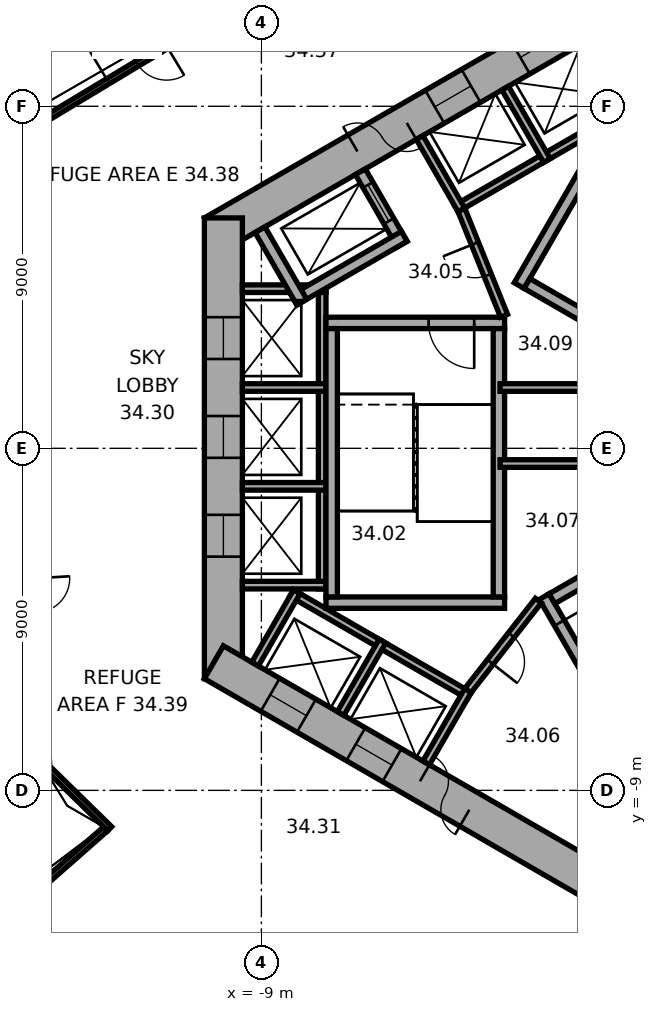
"""IFC4 building model, lengths in metres.
Left out: names, types, materials, properties, quantities, classifications, styles, units other than length and angle.
Written with IfcOpenShell. Run it as: python <this file> out.ifc"""

import sys

from ifc_helpers import new_model, si_unit, direction, frame, frame_2d, origin, place, context, subcontext, project, spatial, rectangle, extrude, element, fill, save


model = new_model("IFC4")
c1 = context("Model", 3, precision=1e-05, world=origin(), true_north=direction((0.0, 1.0)))
c2 = subcontext(c1, "Body", "Model", "MODEL_VIEW")
j1 = project(units=[si_unit("LENGTHUNIT", "METRE"), si_unit("PLANEANGLEUNIT", "RADIAN")], contexts=[c1])
p1 = place(None, origin())
s1 = spatial("IfcSite", under=j1, at=p1, CompositionType="ELEMENT")
p2 = place(p1, origin())
s2 = spatial("IfcBuilding", under=s1, at=p2, CompositionType="ELEMENT")
p3 = place(p2, frame((0.0, 0.0, 139.2)))
s3 = spatial("IfcBuildingStorey", under=s2, at=p3, CompositionType="ELEMENT", Elevation=139.2)
p4 = place(p3, frame((0.25, 11.691, 0.0), z_axis=(0.0, 0.0, 1.0), x_axis=(-0.866022616891, -0.50000482701, 0.0)))
e1 = element("IfcWall", 1, at=p4, inside=s3, PredefinedType="SHEAR", context=c2, shape_type="SweptSolid", body=[
    extrude(rectangle(XDim=12.125, YDim=1.0, at=frame_2d((6.062, 0.0))), origin(), (0.0, 0.0, 1.0), 7.4),
])
p5 = place(p4, frame((6.262, 0.0, 0.0)))
e2 = element("IfcOpeningElement", 2, at=p5, cuts=e1, PredefinedType="OPENING", context=c2, shape_type="SweptSolid", body=[
    extrude(rectangle(XDim=1.5, YDim=2.1, at=frame_2d((0.75, 1.05))), frame((0.0, 0.51, 0.0), z_axis=(0.0, -1.0, 0.0), x_axis=(1.0, 0.0, 0.0)), (0.0, 0.0, 1.0), 1.02),
])
p6 = place(p4, frame((1.712, 0.0, 0.0)))
e3 = element("IfcOpeningElement", 3, at=p6, cuts=e1, PredefinedType="OPENING", context=c2, shape_type="SweptSolid", body=[
    extrude(rectangle(XDim=1.1, YDim=2.1, at=frame_2d((0.55, 1.05))), frame((0.0, 0.51, 0.0), z_axis=(0.0, -1.0, 0.0), x_axis=(1.0, 0.0, 0.0)), (0.0, 0.0, 1.0), 1.02),
])
p7 = place(p4, frame((4.312, 0.0, 0.0)))
e4 = element("IfcOpeningElement", 4, at=p7, cuts=e1, PredefinedType="OPENING", context=c2, shape_type="SweptSolid", body=[
    extrude(rectangle(XDim=1.1, YDim=2.1, at=frame_2d((0.55, 1.05))), frame((0.0, 0.51, 0.0), z_axis=(0.0, -1.0, 0.0), x_axis=(1.0, 0.0, 0.0)), (0.0, 0.0, 1.0), 1.02),
])
p8 = place(p3, frame((-10.0, 6.062, 0.0), z_axis=(0.0, 0.0, 1.0), x_axis=(0.0, -1.0, 0.0)))
e5 = element("IfcWall", 5, at=p8, inside=s3, PredefinedType="SHEAR", context=c2, shape_type="SweptSolid", body=[
    extrude(rectangle(XDim=12.125, YDim=1.0, at=frame_2d((6.062, 0.0))), origin(), (0.0, 0.0, 1.0), 7.4),
])
p9 = place(p8, frame((5.212, 0.0, 0.0)))
e6 = element("IfcOpeningElement", 6, at=p9, cuts=e5, PredefinedType="OPENING", context=c2, shape_type="SweptSolid", body=[
    extrude(rectangle(XDim=1.1, YDim=2.1, at=frame_2d((0.55, 1.05))), frame((0.0, 0.51, 0.0), z_axis=(0.0, -1.0, 0.0), x_axis=(1.0, 0.0, 0.0)), (0.0, 0.0, 1.0), 1.02),
])
p10 = place(p8, frame((7.812, 0.0, 0.0)))
e7 = element("IfcOpeningElement", 7, at=p10, cuts=e5, PredefinedType="OPENING", context=c2, shape_type="SweptSolid", body=[
    extrude(rectangle(XDim=1.1, YDim=2.1, at=frame_2d((0.55, 1.05))), frame((0.0, 0.51, 0.0), z_axis=(0.0, -1.0, 0.0), x_axis=(1.0, 0.0, 0.0)), (0.0, 0.0, 1.0), 1.02),
])
p11 = place(p8, frame((2.612, 0.0, 0.0)))
e8 = element("IfcOpeningElement", 8, at=p11, cuts=e5, PredefinedType="OPENING", context=c2, shape_type="SweptSolid", body=[
    extrude(rectangle(XDim=1.1, YDim=2.1, at=frame_2d((0.55, 1.05))), frame((0.0, 0.51, 0.0), z_axis=(0.0, -1.0, 0.0), x_axis=(1.0, 0.0, 0.0)), (0.0, 0.0, 1.0), 1.02),
])
p12 = place(p3, frame((-10.25, -5.629, 0.0), z_axis=(0.0, 0.0, 1.0), x_axis=(0.866022616891, -0.50000482701, 0.0)))
e9 = element("IfcWall", 9, at=p12, inside=s3, PredefinedType="SHEAR", context=c2, shape_type="SweptSolid", body=[
    extrude(rectangle(XDim=12.125, YDim=1.0, at=frame_2d((6.062, 0.0))), origin(), (0.0, 0.0, 1.0), 7.4),
])
p13 = place(p12, frame((6.262, 0.0, 0.0)))
e10 = element("IfcOpeningElement", 10, at=p13, cuts=e9, PredefinedType="OPENING", context=c2, shape_type="SweptSolid", body=[
    extrude(rectangle(XDim=1.5, YDim=2.1, at=frame_2d((0.75, 1.05))), frame((0.0, 0.51, 0.0), z_axis=(0.0, -1.0, 0.0), x_axis=(1.0, 0.0, 0.0)), (0.0, 0.0, 1.0), 1.02),
])
p14 = place(p12, frame((1.712, 0.0, 0.0)))
e11 = element("IfcOpeningElement", 11, at=p14, cuts=e9, PredefinedType="OPENING", context=c2, shape_type="SweptSolid", body=[
    extrude(rectangle(XDim=1.1, YDim=2.1, at=frame_2d((0.55, 1.05))), frame((0.0, 0.51, 0.0), z_axis=(0.0, -1.0, 0.0), x_axis=(1.0, 0.0, 0.0)), (0.0, 0.0, 1.0), 1.02),
])
p15 = place(p12, frame((4.312, 0.0, 0.0)))
e12 = element("IfcOpeningElement", 12, at=p15, cuts=e9, PredefinedType="OPENING", context=c2, shape_type="SweptSolid", body=[
    extrude(rectangle(XDim=1.1, YDim=2.1, at=frame_2d((0.55, 1.05))), frame((0.0, 0.51, 0.0), z_axis=(0.0, -1.0, 0.0), x_axis=(1.0, 0.0, 0.0)), (0.0, 0.0, 1.0), 1.02),
])
p16 = place(p3, frame((-17.239, -13.656, 0.0), z_axis=(0.0, 0.0, 1.0), x_axis=(0.750678331628, 0.660667876034, 0.0)))
e13 = element("IfcWall", 13, at=p16, inside=s3, PredefinedType="STANDARD", context=c2, shape_type="SweptSolid", body=[
    extrude(rectangle(XDim=5.506, YDim=0.15, at=frame_2d((2.753, 0.0))), origin(), (0.0, 0.0, 1.0), 2.6),
])
p17 = place(p3, frame((-12.991, -10.01, 0.0), z_axis=(0.0, 0.0, 1.0), x_axis=(-0.714492233151, 0.69964337256, 0.0)))
e14 = element("IfcWall", 14, at=p17, inside=s3, PredefinedType="STANDARD", context=c2, shape_type="SweptSolid", body=[
    extrude(rectangle(XDim=2.236, YDim=0.15, at=frame_2d((1.118, 0.0))), origin(), (0.0, 0.0, 1.0), 2.6),
])
p18 = place(p3, frame((-15.687, 8.062, 0.0), z_axis=(0.0, 0.0, 1.0), x_axis=(0.856487923842, 0.516167062406, 0.0)))
e15 = element("IfcWall", 15, at=p18, inside=s3, PredefinedType="STANDARD", context=c2, shape_type="SweptSolid", body=[
    extrude(rectangle(XDim=15.973, YDim=0.15, at=frame_2d((7.987, 0.0))), origin(), (0.0, 0.0, 1.0), 2.6),
])
p19 = place(p18, frame((3.093, 0.0, 0.0)))
e16 = element("IfcOpeningElement", 16, at=p19, cuts=e15, PredefinedType="OPENING", context=c2, shape_type="SweptSolid", body=[
    extrude(rectangle(XDim=1.8, YDim=2.4, at=frame_2d((0.9, 1.2))), frame((0.0, 0.085, 0.0), z_axis=(0.0, -1.0, 0.0), x_axis=(1.0, 0.0, 0.0)), (0.0, 0.0, 1.0), 0.17),
])
p20 = place(p18, frame((11.08, 0.0, 0.0)))
e17 = element("IfcOpeningElement", 17, at=p20, cuts=e15, PredefinedType="OPENING", context=c2, shape_type="SweptSolid", body=[
    extrude(rectangle(XDim=1.8, YDim=2.4, at=frame_2d((0.9, 1.2))), frame((0.0, 0.085, 0.0), z_axis=(0.0, -1.0, 0.0), x_axis=(1.0, 0.0, 0.0)), (0.0, 0.0, 1.0), 0.17),
])
p21 = place(p3, frame((0.803, 9.009, 0.0), z_axis=(0.0, 0.0, 1.0), x_axis=(-0.866028230842, -0.499995103361, 0.0)))
e18 = element("IfcWall", 18, at=p21, inside=s3, PredefinedType="PARTITIONING", context=c2, shape_type="SweptSolid", body=[
    extrude(rectangle(XDim=5.4, YDim=0.2, at=frame_2d((2.7, 0.0))), origin(), (0.0, 0.0, 1.0), 7.12),
])
for number, where, z_axis, x_axis in (
    (19, (-1.485, 7.572, 0.0), (0.0, 0.0, 1.0), (-0.5, 0.866, 0.0)),
    (20, (-3.737, 6.272, 0.0), (0.0, 0.0, 1.0), (-0.5, 0.866, 0.0)),
):
    element("IfcWall", number, at=place(p3, frame(where, z_axis=z_axis, x_axis=x_axis)), inside=s3, PredefinedType="PARTITIONING", context=c2, shape_type="SweptSolid", body=[
        extrude(rectangle(XDim=2.2, YDim=0.2, at=frame_2d((1.1, 0.0))), origin(), (0.0, 0.0, 1.0), 7.12),
    ])
p22 = place(p3, frame((-7.4, 4.3, 0.0), z_axis=(0.0, 0.0, 1.0), x_axis=(0.0, -1.0, 0.0)))
e21 = element("IfcWall", 21, at=p22, inside=s3, PredefinedType="PARTITIONING", context=c2, shape_type="SweptSolid", body=[
    extrude(rectangle(XDim=8.0, YDim=0.2, at=frame_2d((4.0, 0.0))), origin(), (0.0, 0.0, 1.0), 7.12),
])
for number, where, z_axis, x_axis in (
    (22, (-7.3, 4.2, 0.0), (0.0, 0.0, 1.0), (-1.0, 0.0, 0.0)),
    (23, (-7.3, 1.6, 0.0), (0.0, 0.0, 1.0), (-1.0, 0.0, 0.0)),
    (24, (-7.3, -1.0, 0.0), (0.0, 0.0, 1.0), (-1.0, 0.0, 0.0)),
    (25, (-7.3, -3.6, 0.0), (0.0, 0.0, 1.0), (-1.0, 0.0, 0.0)),
):
    element("IfcWall", number, at=place(p3, frame(where, z_axis=z_axis, x_axis=x_axis)), inside=s3, PredefinedType="PARTITIONING", context=c2, shape_type="SweptSolid", body=[
        extrude(rectangle(XDim=2.2, YDim=0.2, at=frame_2d((1.1, 0.0))), origin(), (0.0, 0.0, 1.0), 7.12),
    ])
p23 = place(p3, frame((-8.203, -3.809, 0.0), z_axis=(0.0, 0.0, 1.0), x_axis=(0.866028230842, -0.499995103361, 0.0)))
e26 = element("IfcWall", 26, at=p23, inside=s3, PredefinedType="PARTITIONING", context=c2, shape_type="SweptSolid", body=[
    extrude(rectangle(XDim=5.4, YDim=0.2, at=frame_2d((2.7, 0.0))), origin(), (0.0, 0.0, 1.0), 7.12),
])
for number, where, z_axis, x_axis in (
    (27, (-8.067, -3.772, 0.0), (0.0, 0.0, 1.0), (-0.5, -0.866, 0.0)),
    (28, (-5.815, -5.072, 0.0), (0.0, 0.0, 1.0), (-0.5, -0.866, 0.0)),
):
    element("IfcWall", number, at=place(p3, frame(where, z_axis=z_axis, x_axis=x_axis)), inside=s3, PredefinedType="PARTITIONING", context=c2, shape_type="SweptSolid", body=[
        extrude(rectangle(XDim=2.2, YDim=0.2, at=frame_2d((1.1, 0.0))), origin(), (0.0, 0.0, 1.0), 7.12),
    ])
p24 = place(p3, frame((-3.563, -6.372, 0.0), z_axis=(0.0, 0.0, 1.0), x_axis=(-0.499994660107, -0.866028486751, 0.0)))
e29 = element("IfcWall", 29, at=p24, inside=s3, PredefinedType="PARTITIONING", context=c2, shape_type="SweptSolid", body=[
    extrude(rectangle(XDim=2.2, YDim=0.2, at=frame_2d((1.1, 0.0))), origin(), (0.0, 0.0, 1.0), 7.12),
])
p25 = place(p3, frame((-2.216, 4.282, 0.0), z_axis=(0.0, 0.0, 1.0), x_axis=(0.499977259774, 0.866038532462, 0.0)))
e30 = element("IfcWall", 30, at=p25, inside=s3, PredefinedType="SHEAR", context=c2, shape_type="SweptSolid", body=[
    extrude(rectangle(XDim=4.7, YDim=0.3, at=frame_2d((2.35, 0.0))), origin(), (0.0, 0.0, 1.0), 7.12),
])
p26 = place(p3, frame((4.103, 0.807, 0.0), z_axis=(0.0, 0.0, 1.0), x_axis=(-0.866027801685, 0.499995846692, 0.0)))
e31 = element("IfcWall", 31, at=p26, inside=s3, PredefinedType="SHEAR", context=c2, shape_type="SweptSolid", body=[
    extrude(rectangle(XDim=7.06, YDim=0.3, at=frame_2d((3.53, 0.0))), origin(), (0.0, 0.0, 1.0), 7.12),
])
p27 = place(p3, frame((-2.6, 3.3, 0.0), z_axis=(0.0, 0.0, 1.0), x_axis=(-1.0, 0.0, 0.0)))
e32 = element("IfcWall", 32, at=p27, inside=s3, PredefinedType="SHEAR", context=c2, shape_type="SweptSolid", body=[
    extrude(rectangle(XDim=4.7, YDim=0.3, at=frame_2d((2.35, 0.0))), origin(), (0.0, 0.0, 1.0), 7.12),
])
p28 = place(p27, frame((0.8, 0.0, 0.0)))
e33 = element("IfcOpeningElement", 33, at=p28, cuts=e32, PredefinedType="OPENING", context=c2, shape_type="SweptSolid", body=[
    extrude(rectangle(XDim=1.2, YDim=2.1, at=frame_2d((0.6, 1.05))), frame((0.0, 0.16, 0.0), z_axis=(0.0, -1.0, 0.0), x_axis=(1.0, 0.0, 0.0)), (0.0, 0.0, 1.0), 0.32),
])
p29 = place(p3, frame((-2.6, -4.06, 0.0), z_axis=(0.0, 0.0, 1.0), x_axis=(-1.0, 0.0, 0.0)))
e34 = element("IfcWall", 34, at=p29, inside=s3, PredefinedType="SHEAR", context=c2, shape_type="SweptSolid", body=[
    extrude(rectangle(XDim=4.7, YDim=0.3, at=frame_2d((2.35, 0.0))), origin(), (0.0, 0.0, 1.0), 7.12),
])
for number, where, z_axis, x_axis in (
    (35, (-2.75, 3.15, 0.0), (0.0, 0.0, 1.0), (0.0, -1.0, 0.0)),
    (36, (-7.15, 3.15, 0.0), (0.0, 0.0, 1.0), (0.0, -1.0, 0.0)),
):
    element("IfcWall", number, at=place(p3, frame(where, z_axis=z_axis, x_axis=x_axis)), inside=s3, PredefinedType="SHEAR", context=c2, shape_type="SweptSolid", body=[
        extrude(rectangle(XDim=7.06, YDim=0.3, at=frame_2d((3.53, 0.0))), origin(), (0.0, 0.0, 1.0), 7.12),
    ])
p30 = place(p3, frame((-1.558, -3.902, 0.0), z_axis=(0.0, 0.0, 1.0), x_axis=(0.499977259774, -0.866038532462, 0.0)))
e37 = element("IfcWall", 37, at=p30, inside=s3, PredefinedType="SHEAR", context=c2, shape_type="SweptSolid", body=[
    extrude(rectangle(XDim=4.7, YDim=0.3, at=frame_2d((2.35, 0.0))), origin(), (0.0, 0.0, 1.0), 7.12),
])
p31 = place(p30, frame((0.8, 0.0, 0.0)))
e38 = element("IfcOpeningElement", 38, at=p31, cuts=e37, PredefinedType="OPENING", context=c2, shape_type="SweptSolid", body=[
    extrude(rectangle(XDim=1.2, YDim=2.1, at=frame_2d((0.6, 1.05))), frame((0.0, 0.16, 0.0), z_axis=(0.0, -1.0, 0.0), x_axis=(1.0, 0.0, 0.0)), (0.0, 0.0, 1.0), 0.32),
])
p32 = place(p3, frame((-1.353, -3.957, 0.0), z_axis=(0.0, 0.0, 1.0), x_axis=(0.866027801685, 0.499995846692, 0.0)))
e39 = element("IfcWall", 39, at=p32, inside=s3, PredefinedType="SHEAR", context=c2, shape_type="SweptSolid", body=[
    extrude(rectangle(XDim=7.06, YDim=0.3, at=frame_2d((3.53, 0.0))), origin(), (0.0, 0.0, 1.0), 7.12),
])
p33 = place(p3, frame((-5.295, 5.372, 0.0), z_axis=(0.0, 0.0, 1.0), x_axis=(-0.500077893725, 0.86598042715, 0.0)))
e40 = element("IfcWall", 40, at=p33, inside=s3, PredefinedType="SHEAR", context=c2, shape_type="SweptSolid", body=[
    extrude(rectangle(XDim=2.2, YDim=0.3, at=frame_2d((1.1, 0.0))), origin(), (0.0, 0.0, 1.0), 7.12),
])
p34 = place(p33, frame((0.7, 0.0, 0.0)))
e41 = element("IfcOpeningElement", 41, at=p34, cuts=e40, PredefinedType="OPENING", context=c2, shape_type="SweptSolid", body=[
    extrude(rectangle(XDim=1.1, YDim=2.1, at=frame_2d((0.55, 1.05))), frame((0.0, 0.16, 0.0), z_axis=(0.0, -1.0, 0.0), x_axis=(1.0, 0.0, 0.0)), (0.0, 0.0, 1.0), 0.32),
])
p35 = place(p3, frame((-5.24, 5.577, 0.0), z_axis=(0.0, 0.0, 1.0), x_axis=(-0.866014461049, -0.500018952895, 0.0)))
e42 = element("IfcWall", 42, at=p35, inside=s3, PredefinedType="SHEAR", context=c2, shape_type="SweptSolid", body=[
    extrude(rectangle(XDim=3.35, YDim=0.3, at=frame_2d((1.675, 0.0))), origin(), (0.0, 0.0, 1.0), 7.12),
])
p36 = place(p3, frame((-7.937, 3.847, 0.0), z_axis=(0.0, 0.0, 1.0), x_axis=(-0.50002983664, 0.866008176907, 0.0)))
e43 = element("IfcWall", 43, at=p36, inside=s3, PredefinedType="SHEAR", context=c2, shape_type="SweptSolid", body=[
    extrude(rectangle(XDim=2.2, YDim=0.3, at=frame_2d((1.1, 0.0))), origin(), (0.0, 0.0, 1.0), 7.12),
])
p37 = place(p3, frame((-2.615, 3.487, 0.0), z_axis=(0.0, 0.0, 1.0), x_axis=(-0.373576831041, 0.92759924068, 0.0)))
e44 = element("IfcWall", 44, at=p37, inside=s3, PredefinedType="PARTITIONING", context=c2, shape_type="SweptSolid", body=[
    extrude(rectangle(XDim=3.002, YDim=0.2, at=frame_2d((1.501, 0.0))), origin(), (0.0, 0.0, 1.0), 7.12),
])
p38 = place(p37, frame((1.15, 0.0, 0.0)))
e45 = element("IfcOpeningElement", 45, at=p38, cuts=e44, PredefinedType="OPENING", context=c2, shape_type="SweptSolid", body=[
    extrude(rectangle(XDim=0.9, YDim=2.1, at=frame_2d((0.45, 1.05))), frame((0.0, 0.11, 0.0), z_axis=(0.0, -1.0, 0.0), x_axis=(1.0, 0.0, 0.0)), (0.0, 0.0, 1.0), 0.22),
])
p39 = place(p3, frame((-1.712, -4.008, 0.0), z_axis=(0.0, 0.0, 1.0), x_axis=(-0.616549420702, -0.787316208287, 0.0)))
e46 = element("IfcWall", 46, at=p39, inside=s3, PredefinedType="PARTITIONING", context=c2, shape_type="SweptSolid", body=[
    extrude(rectangle(XDim=3.002, YDim=0.2, at=frame_2d((1.501, 0.0))), origin(), (0.0, 0.0, 1.0), 7.12),
])
p40 = place(p39, frame((1.15, 0.0, 0.0)))
e47 = element("IfcOpeningElement", 47, at=p40, cuts=e46, PredefinedType="OPENING", context=c2, shape_type="SweptSolid", body=[
    extrude(rectangle(XDim=0.9, YDim=2.1, at=frame_2d((0.45, 1.05))), frame((0.0, 0.11, 0.0), z_axis=(0.0, -1.0, 0.0), x_axis=(1.0, 0.0, 0.0)), (0.0, 0.0, 1.0), 0.22),
])
p41 = place(p3, frame((-2.72, -0.4, 0.0), z_axis=(0.0, 0.0, 1.0), x_axis=(1.0, 0.0, 0.0)))
e48 = element("IfcWall", 48, at=p41, inside=s3, PredefinedType="PARTITIONING", context=c2, shape_type="SweptSolid", body=[
    extrude(rectangle(XDim=7.347, YDim=0.2, at=frame_2d((3.674, 0.0))), origin(), (0.0, 0.0, 1.0), 7.12),
])
p42 = place(p3, frame((-2.72, 1.6, 0.0), z_axis=(0.0, 0.0, 1.0), x_axis=(1.0, 0.0, 0.0)))
e49 = element("IfcWall", 49, at=p42, inside=s3, PredefinedType="PARTITIONING", context=c2, shape_type="SweptSolid", body=[
    extrude(rectangle(XDim=5.269, YDim=0.2, at=frame_2d((2.634, 0.0))), origin(), (0.0, 0.0, 1.0), 7.12),
])
p43 = place(p19, origin())
e50 = element("IfcDoor", 50, at=p43, inside=s3, OperationType="DOUBLE_DOOR_DOUBLE_SWING", PredefinedType="DOOR", context=c2, shape_type="SweptSolid", body=[
    extrude(rectangle(XDim=1.8, YDim=2.4, at=frame_2d((0.9, 1.2))), frame((0.0, 0.025, 0.0), z_axis=(0.0, -1.0, 0.0), x_axis=(1.0, 0.0, 0.0)), (0.0, 0.0, 1.0), 0.05),
])
fill(e16, e50)
p44 = place(p5, origin())
e51 = element("IfcDoor", 51, at=p44, inside=s3, OperationType="DOUBLE_DOOR_SINGLE_SWING", PredefinedType="DOOR", context=c2, shape_type="SweptSolid", body=[
    extrude(rectangle(XDim=1.5, YDim=2.1, at=frame_2d((0.75, 1.05))), frame((0.0, 0.025, 0.0), z_axis=(0.0, -1.0, 0.0), x_axis=(1.0, 0.0, 0.0)), (0.0, 0.0, 1.0), 0.05),
])
fill(e2, e51)
p45 = place(p13, origin())
e52 = element("IfcDoor", 52, at=p45, inside=s3, OperationType="DOUBLE_DOOR_SINGLE_SWING", PredefinedType="DOOR", context=c2, shape_type="SweptSolid", body=[
    extrude(rectangle(XDim=1.5, YDim=2.1, at=frame_2d((0.75, 1.05))), frame((0.0, 0.025, 0.0), z_axis=(0.0, -1.0, 0.0), x_axis=(1.0, 0.0, 0.0)), (0.0, 0.0, 1.0), 0.05),
])
fill(e10, e52)
p46 = place(p28, origin())
e53 = element("IfcDoor", 53, at=p46, inside=s3, OperationType="SINGLE_SWING_RIGHT", PredefinedType="DOOR", context=c2, shape_type="SweptSolid", body=[
    extrude(rectangle(XDim=1.2, YDim=2.1, at=frame_2d((0.6, 1.05))), frame((0.0, 0.025, 0.0), z_axis=(0.0, -1.0, 0.0), x_axis=(1.0, 0.0, 0.0)), (0.0, 0.0, 1.0), 0.05),
])
fill(e33, e53)
p47 = place(p31, origin())
e54 = element("IfcDoor", 54, at=p47, inside=s3, OperationType="SINGLE_SWING_RIGHT", PredefinedType="DOOR", context=c2, shape_type="SweptSolid", body=[
    extrude(rectangle(XDim=1.2, YDim=2.1, at=frame_2d((0.6, 1.05))), frame((0.0, 0.025, 0.0), z_axis=(0.0, -1.0, 0.0), x_axis=(1.0, 0.0, 0.0)), (0.0, 0.0, 1.0), 0.05),
])
fill(e38, e54)
p48 = place(p38, origin())
e55 = element("IfcDoor", 55, at=p48, inside=s3, OperationType="SINGLE_SWING_LEFT", PredefinedType="DOOR", context=c2, shape_type="SweptSolid", body=[
    extrude(rectangle(XDim=0.9, YDim=2.1, at=frame_2d((0.45, 1.05))), frame((0.0, 0.025, 0.0), z_axis=(0.0, -1.0, 0.0), x_axis=(1.0, 0.0, 0.0)), (0.0, 0.0, 1.0), 0.05),
])
fill(e45, e55)
p49 = place(p40, origin())
e56 = element("IfcDoor", 56, at=p49, inside=s3, OperationType="SINGLE_SWING_LEFT", PredefinedType="DOOR", context=c2, shape_type="SweptSolid", body=[
    extrude(rectangle(XDim=0.9, YDim=2.1, at=frame_2d((0.45, 1.05))), frame((0.0, 0.025, 0.0), z_axis=(0.0, -1.0, 0.0), x_axis=(1.0, 0.0, 0.0)), (0.0, 0.0, 1.0), 0.05),
])
fill(e47, e56)
p50 = place(p34, origin())
e57 = element("IfcDoor", 57, at=p50, inside=s3, OperationType="DOUBLE_DOOR_SLIDING", PredefinedType="DOOR", context=c2, shape_type="SweptSolid", body=[
    extrude(rectangle(XDim=1.1, YDim=2.1, at=frame_2d((0.55, 1.05))), frame((0.0, 0.025, 0.0), z_axis=(0.0, -1.0, 0.0), x_axis=(1.0, 0.0, 0.0)), (0.0, 0.0, 1.0), 0.05),
])
fill(e41, e57)
p51 = place(p9, origin())
e58 = element("IfcDoor", 58, at=p51, inside=s3, OperationType="DOUBLE_DOOR_SLIDING", PredefinedType="DOOR", context=c2, shape_type="SweptSolid", body=[
    extrude(rectangle(XDim=1.1, YDim=2.1, at=frame_2d((0.55, 1.05))), frame((0.0, 0.025, 0.0), z_axis=(0.0, -1.0, 0.0), x_axis=(1.0, 0.0, 0.0)), (0.0, 0.0, 1.0), 0.05),
])
fill(e6, e58)
p52 = place(p10, origin())
e59 = element("IfcDoor", 59, at=p52, inside=s3, OperationType="DOUBLE_DOOR_SLIDING", PredefinedType="DOOR", context=c2, shape_type="SweptSolid", body=[
    extrude(rectangle(XDim=1.1, YDim=2.1, at=frame_2d((0.55, 1.05))), frame((0.0, 0.025, 0.0), z_axis=(0.0, -1.0, 0.0), x_axis=(1.0, 0.0, 0.0)), (0.0, 0.0, 1.0), 0.05),
])
fill(e7, e59)
p53 = place(p14, origin())
e60 = element("IfcDoor", 60, at=p53, inside=s3, OperationType="DOUBLE_DOOR_SLIDING", PredefinedType="DOOR", context=c2, shape_type="SweptSolid", body=[
    extrude(rectangle(XDim=1.1, YDim=2.1, at=frame_2d((0.55, 1.05))), frame((0.0, 0.025, 0.0), z_axis=(0.0, -1.0, 0.0), x_axis=(1.0, 0.0, 0.0)), (0.0, 0.0, 1.0), 0.05),
])
fill(e11, e60)
p54 = place(p15, origin())
e61 = element("IfcDoor", 61, at=p54, inside=s3, OperationType="DOUBLE_DOOR_SLIDING", PredefinedType="DOOR", context=c2, shape_type="SweptSolid", body=[
    extrude(rectangle(XDim=1.1, YDim=2.1, at=frame_2d((0.55, 1.05))), frame((0.0, 0.025, 0.0), z_axis=(0.0, -1.0, 0.0), x_axis=(1.0, 0.0, 0.0)), (0.0, 0.0, 1.0), 0.05),
])
fill(e12, e61)
p55 = place(p6, origin())
e62 = element("IfcDoor", 62, at=p55, inside=s3, OperationType="DOUBLE_DOOR_SLIDING", PredefinedType="DOOR", context=c2, shape_type="SweptSolid", body=[
    extrude(rectangle(XDim=1.1, YDim=2.1, at=frame_2d((0.55, 1.05))), frame((0.0, 0.025, 0.0), z_axis=(0.0, -1.0, 0.0), x_axis=(1.0, 0.0, 0.0)), (0.0, 0.0, 1.0), 0.05),
])
fill(e3, e62)
p56 = place(p7, origin())
e63 = element("IfcDoor", 63, at=p56, inside=s3, OperationType="DOUBLE_DOOR_SLIDING", PredefinedType="DOOR", context=c2, shape_type="SweptSolid", body=[
    extrude(rectangle(XDim=1.1, YDim=2.1, at=frame_2d((0.55, 1.05))), frame((0.0, 0.025, 0.0), z_axis=(0.0, -1.0, 0.0), x_axis=(1.0, 0.0, 0.0)), (0.0, 0.0, 1.0), 0.05),
])
fill(e4, e63)
p57 = place(p11, origin())
e64 = element("IfcDoor", 64, at=p57, inside=s3, OperationType="DOUBLE_DOOR_SLIDING", PredefinedType="DOOR", context=c2, shape_type="SweptSolid", body=[
    extrude(rectangle(XDim=1.1, YDim=2.1, at=frame_2d((0.55, 1.05))), frame((0.0, 0.025, 0.0), z_axis=(0.0, -1.0, 0.0), x_axis=(1.0, 0.0, 0.0)), (0.0, 0.0, 1.0), 0.05),
])
fill(e8, e64)
save(model, sys.argv[1])
